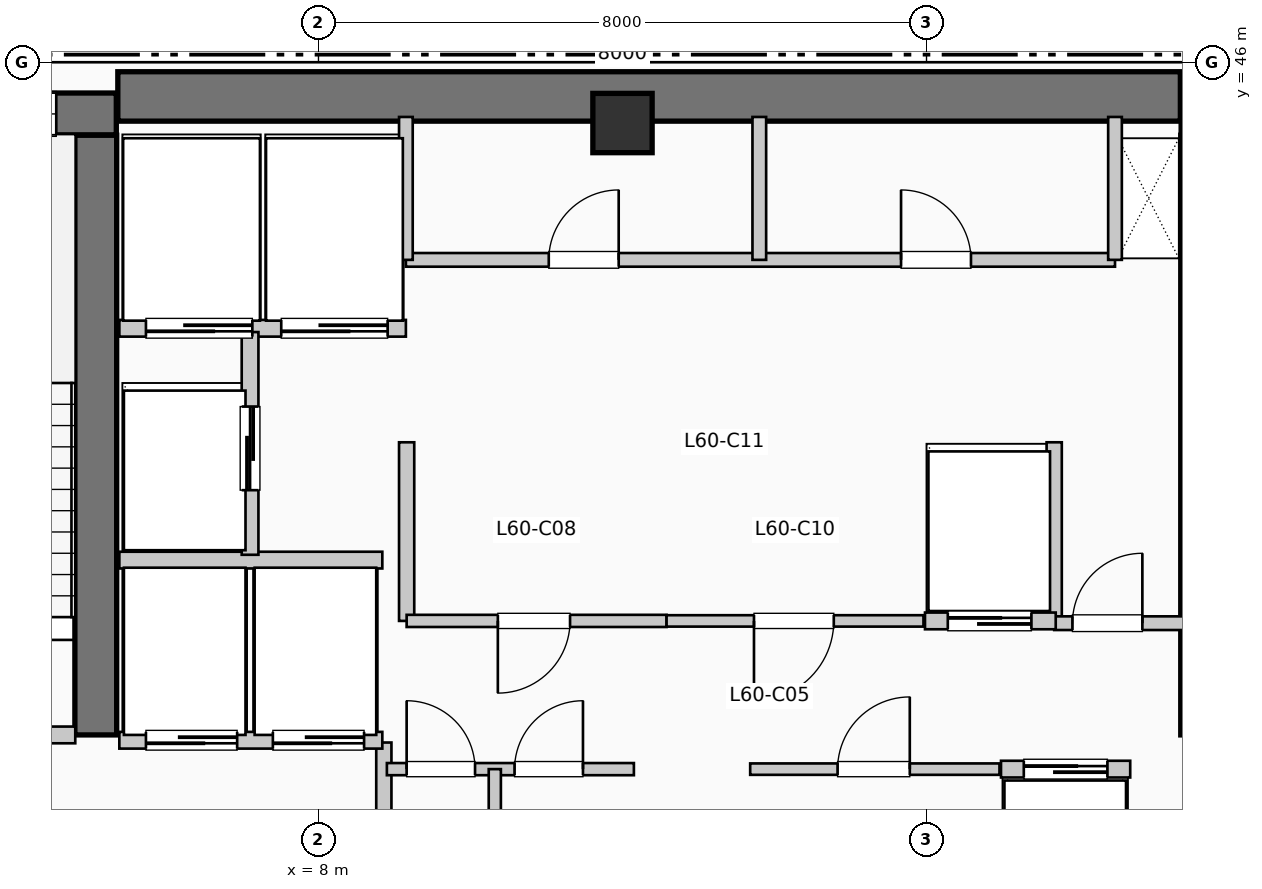
"""IFC4 building model, lengths in metres.
Left out: names, types, materials, properties, quantities, classifications, styles, units other than length and angle.
Written with IfcOpenShell. Run it as: python <this file> out.ifc"""

import sys

from ifc_helpers import new_model, si_unit, direction, frame, frame_2d, origin, origin_2d, place, context, subcontext, project, spatial, rectangle, extrude, element, fill, save


model = new_model("IFC4")
c1 = context("Model", 3, precision=1e-05, world=origin(), true_north=direction((0.0, 1.0)))
c2 = subcontext(c1, "Body", "Model", "MODEL_VIEW")
j1 = project(units=[si_unit("LENGTHUNIT", "METRE"), si_unit("PLANEANGLEUNIT", "RADIAN")], contexts=[c1])
p1 = place(None, origin())
s1 = spatial("IfcSite", under=j1, at=p1, CompositionType="ELEMENT")
p2 = place(p1, origin())
s2 = spatial("IfcBuilding", under=s1, at=p2, CompositionType="ELEMENT")
p3 = place(p2, frame((0.0, 0.0, 247.5)))
s3 = spatial("IfcBuildingStorey", under=s2, at=p3, CompositionType="ELEMENT", Elevation=247.5)
p4 = place(p3, frame((5.36, 45.55, 0.0), z_axis=(0.0, 0.0, 1.0), x_axis=(1.0, 0.0, 0.0)))
e1 = element("IfcWall", 1, at=p4, inside=s3, PredefinedType="SHEAR", context=c2, shape_type="SweptSolid", body=[
    extrude(rectangle(XDim=13.98, YDim=0.65, at=frame_2d((6.99, 0.0))), origin(), (0.0, 0.0, 1.0), 3.96),
])
p5 = place(p3, frame((5.07, 37.15, 0.0), z_axis=(0.0, 0.0, 1.0), x_axis=(0.0, 1.0, 0.0)))
e2 = element("IfcWall", 2, at=p5, inside=s3, PredefinedType="SHEAR", context=c2, shape_type="SweptSolid", body=[
    extrude(rectangle(XDim=7.89, YDim=0.55, at=frame_2d((3.945, 0.0))), origin(), (0.0, 0.0, 1.0), 3.96),
])
p6 = place(p3, frame((1.1, 45.32, 0.0), z_axis=(0.0, 0.0, 1.0), x_axis=(1.0, 0.0, 0.0)))
e3 = element("IfcWall", 3, at=p6, inside=s3, PredefinedType="SHEAR", context=c2, shape_type="SweptSolid", body=[
    extrude(rectangle(XDim=4.24, YDim=0.55, at=frame_2d((2.12, 0.0))), origin(), (0.0, 0.0, 1.0), 3.96),
])
p7 = place(p6, frame((2.05, 0.0, 1.05)))
e4 = element("IfcOpeningElement", 4, at=p7, cuts=e3, PredefinedType="OPENING", context=c2, shape_type="SweptSolid", body=[
    extrude(rectangle(XDim=1.4, YDim=1.8, at=frame_2d((0.7, 0.9))), frame((0.0, 0.285, 0.0), z_axis=(0.0, -1.0, 0.0), x_axis=(1.0, 0.0, 0.0)), (0.0, 0.0, 1.0), 0.57),
])
p8 = place(p3, frame((19.62, 37.15, 0.0), z_axis=(0.0, 0.0, 1.0), x_axis=(0.0, 1.0, 0.0)))
e5 = element("IfcWall", 5, at=p8, inside=s3, PredefinedType="SHEAR", context=c2, shape_type="SweptSolid", body=[
    extrude(rectangle(XDim=7.89, YDim=0.55, at=frame_2d((3.945, 0.0))), origin(), (0.0, 0.0, 1.0), 3.96),
])
p9 = place(p3, frame((19.35, 45.32, 0.0), z_axis=(0.0, 0.0, 1.0), x_axis=(1.0, 0.0, 0.0)))
e6 = element("IfcWall", 6, at=p9, inside=s3, PredefinedType="SHEAR", context=c2, shape_type="SweptSolid", body=[
    extrude(rectangle(XDim=3.69, YDim=0.55, at=frame_2d((1.845, 0.0))), origin(), (0.0, 0.0, 1.0), 3.96),
])
p10 = place(p9, frame((1.15, 0.0, 1.05)))
e7 = element("IfcOpeningElement", 7, at=p10, cuts=e6, PredefinedType="OPENING", context=c2, shape_type="SweptSolid", body=[
    extrude(rectangle(XDim=1.4, YDim=1.8, at=frame_2d((0.7, 0.9))), frame((0.0, 0.285, 0.0), z_axis=(0.0, -1.0, 0.0), x_axis=(1.0, 0.0, 0.0)), (0.0, 0.0, 1.0), 0.57),
])
p11 = place(p3, frame((12.0, 45.2, 0.0), z_axis=(0.0, 0.0, 1.0), x_axis=(1.0, 0.0, 0.0)))
e8 = element("IfcColumn", 8, at=p11, inside=s3, PredefinedType="COLUMN", context=c2, shape_type="SweptSolid", body=[
    extrude(rectangle(XDim=0.78, YDim=0.78, at=origin_2d()), origin(), (0.0, 0.0, 1.0), 3.96),
])
p12 = place(p3, frame((1.65, 37.15, 0.0), z_axis=(0.0, 0.0, 1.0), x_axis=(1.0, 0.0, 0.0)))
e9 = element("IfcWall", 9, at=p12, inside=s3, PredefinedType="PARTITIONING", context=c2, shape_type="SweptSolid", body=[
    extrude(rectangle(XDim=3.15, YDim=0.22, at=frame_2d((1.575, 0.0))), origin(), (0.0, 0.0, 1.0), 3.54),
])
p13 = place(p12, frame((2.05, 0.0, 0.0), z_axis=(0.0, 0.0, 1.0), x_axis=(-1.0, 0.0, 0.0)))
e10 = element("IfcOpeningElement", 10, at=p13, cuts=e9, PredefinedType="OPENING", context=c2, shape_type="SweptSolid", body=[
    extrude(rectangle(XDim=1.05, YDim=2.15, at=frame_2d((0.525, 1.075))), frame((0.0, 0.12, 0.0), z_axis=(0.0, -1.0, 0.0), x_axis=(1.0, 0.0, 0.0)), (0.0, 0.0, 1.0), 0.24),
])
p14 = place(p3, frame((8.86, 34.55, 0.0), z_axis=(0.0, 0.0, 1.0), x_axis=(0.0, 1.0, 0.0)))
e11 = element("IfcWall", 11, at=p14, inside=s3, PredefinedType="PARTITIONING", context=c2, shape_type="SweptSolid", body=[
    extrude(rectangle(XDim=2.5, YDim=0.2, at=frame_2d((1.25, 0.0))), origin(), (0.0, 0.0, 1.0), 3.54),
])
p15 = place(p3, frame((5.38, 37.08, 0.0), z_axis=(0.0, 0.0, 1.0), x_axis=(1.0, 0.0, 0.0)))
e12 = element("IfcWall", 12, at=p15, inside=s3, PredefinedType="PARTITIONING", context=c2, shape_type="SweptSolid", body=[
    extrude(rectangle(XDim=3.46, YDim=0.22, at=frame_2d((1.73, 0.0))), origin(), (0.0, 0.0, 1.0), 3.54),
])
p16 = place(p15, frame((1.55, 0.0, 0.0), z_axis=(0.0, 0.0, 1.0), x_axis=(-1.0, 0.0, 0.0)))
e13 = element("IfcOpeningElement", 13, at=p16, cuts=e12, PredefinedType="OPENING", context=c2, shape_type="SweptSolid", body=[
    extrude(rectangle(XDim=1.2, YDim=2.2, at=frame_2d((0.6, 1.1))), frame((0.0, 0.12, 0.0), z_axis=(0.0, -1.0, 0.0), x_axis=(1.0, 0.0, 0.0)), (0.0, 0.0, 1.0), 0.24),
])
p17 = place(p15, frame((3.22, 0.0, 0.0), z_axis=(0.0, 0.0, 1.0), x_axis=(-1.0, 0.0, 0.0)))
e14 = element("IfcOpeningElement", 14, at=p17, cuts=e12, PredefinedType="OPENING", context=c2, shape_type="SweptSolid", body=[
    extrude(rectangle(XDim=1.2, YDim=2.2, at=frame_2d((0.6, 1.1))), frame((0.0, 0.12, 0.0), z_axis=(0.0, -1.0, 0.0), x_axis=(1.0, 0.0, 0.0)), (0.0, 0.0, 1.0), 0.24),
])
p18 = place(p3, frame((5.38, 39.45, 0.0), z_axis=(0.0, 0.0, 1.0), x_axis=(1.0, 0.0, 0.0)))
e15 = element("IfcWall", 15, at=p18, inside=s3, PredefinedType="PARTITIONING", context=c2, shape_type="SweptSolid", body=[
    extrude(rectangle(XDim=3.46, YDim=0.22, at=frame_2d((1.73, 0.0))), origin(), (0.0, 0.0, 1.0), 3.54),
])
p19 = place(p3, frame((5.38, 42.5, 0.0), z_axis=(0.0, 0.0, 1.0), x_axis=(1.0, 0.0, 0.0)))
e16 = element("IfcWall", 16, at=p19, inside=s3, PredefinedType="PARTITIONING", context=c2, shape_type="SweptSolid", body=[
    extrude(rectangle(XDim=3.77, YDim=0.22, at=frame_2d((1.885, 0.0))), origin(), (0.0, 0.0, 1.0), 3.54),
])
p20 = place(p19, frame((1.75, 0.0, 0.0), z_axis=(0.0, 0.0, 1.0), x_axis=(-1.0, 0.0, 0.0)))
e17 = element("IfcOpeningElement", 17, at=p20, cuts=e16, PredefinedType="OPENING", context=c2, shape_type="SweptSolid", body=[
    extrude(rectangle(XDim=1.4, YDim=2.2, at=frame_2d((0.7, 1.1))), frame((0.0, 0.12, 0.0), z_axis=(0.0, -1.0, 0.0), x_axis=(1.0, 0.0, 0.0)), (0.0, 0.0, 1.0), 0.24),
])
p21 = place(p19, frame((3.53, 0.0, 0.0), z_axis=(0.0, 0.0, 1.0), x_axis=(-1.0, 0.0, 0.0)))
e18 = element("IfcOpeningElement", 18, at=p21, cuts=e16, PredefinedType="OPENING", context=c2, shape_type="SweptSolid", body=[
    extrude(rectangle(XDim=1.4, YDim=2.2, at=frame_2d((0.7, 1.1))), frame((0.0, 0.12, 0.0), z_axis=(0.0, -1.0, 0.0), x_axis=(1.0, 0.0, 0.0)), (0.0, 0.0, 1.0), 0.24),
])
p22 = place(p3, frame((7.1, 39.52, 0.0), z_axis=(0.0, 0.0, 1.0), x_axis=(0.0, 1.0, 0.0)))
e19 = element("IfcWall", 19, at=p22, inside=s3, PredefinedType="PARTITIONING", context=c2, shape_type="SweptSolid", body=[
    extrude(rectangle(XDim=2.93, YDim=0.22, at=frame_2d((1.465, 0.0))), origin(), (0.0, 0.0, 1.0), 3.54),
])
p23 = place(p22, frame((0.85, 0.0, 0.0)))
e20 = element("IfcOpeningElement", 20, at=p23, cuts=e19, PredefinedType="OPENING", context=c2, shape_type="SweptSolid", body=[
    extrude(rectangle(XDim=1.1, YDim=2.2, at=frame_2d((0.55, 1.1))), frame((0.0, 0.12, 0.0), z_axis=(0.0, -1.0, 0.0), x_axis=(1.0, 0.0, 0.0)), (0.0, 0.0, 1.0), 0.24),
])
for number, where, z_axis, x_axis in (
    (21, (9.16, 38.65, 0.0), (0.0, 0.0, 1.0), (0.0, 1.0, 0.0)),
    (22, (17.68, 38.65, 0.0), (0.0, 0.0, 1.0), (0.0, 1.0, 0.0)),
):
    element("IfcWall", number, at=place(p3, frame(where, z_axis=z_axis, x_axis=x_axis)), inside=s3, PredefinedType="PARTITIONING", context=c2, shape_type="SweptSolid", body=[
        extrude(rectangle(XDim=2.35, YDim=0.2, at=frame_2d((1.175, 0.0))), origin(), (0.0, 0.0, 1.0), 3.54),
    ])
p24 = place(p3, frame((17.68, 38.62, 0.0), z_axis=(0.0, 0.0, 1.0), x_axis=(1.0, 0.0, 0.0)))
e23 = element("IfcWall", 23, at=p24, inside=s3, PredefinedType="PARTITIONING", context=c2, shape_type="SweptSolid", body=[
    extrude(rectangle(XDim=1.84, YDim=0.18, at=frame_2d((0.92, 0.0))), origin(), (0.0, 0.0, 1.0), 3.54),
])
p25 = place(p24, frame((0.24, 0.0, 0.0)))
e24 = element("IfcOpeningElement", 24, at=p25, cuts=e23, PredefinedType="OPENING", context=c2, shape_type="SweptSolid", body=[
    extrude(rectangle(XDim=0.92, YDim=2.1, at=frame_2d((0.46, 1.05))), frame((0.0, 0.1, 0.0), z_axis=(0.0, -1.0, 0.0), x_axis=(1.0, 0.0, 0.0)), (0.0, 0.0, 1.0), 0.2),
])
p26 = place(p3, frame((8.9, 36.7, 0.0), z_axis=(0.0, 0.0, 1.0), x_axis=(1.0, 0.0, 0.0)))
e25 = element("IfcWall", 25, at=p26, inside=s3, PredefinedType="PARTITIONING", context=c2, shape_type="SweptSolid", body=[
    extrude(rectangle(XDim=3.25, YDim=0.16, at=frame_2d((1.625, 0.0))), origin(), (0.0, 0.0, 1.0), 3.54),
])
p27 = place(p26, frame((0.26, 0.0, 0.0)))
e26 = element("IfcOpeningElement", 26, at=p27, cuts=e25, PredefinedType="OPENING", context=c2, shape_type="SweptSolid", body=[
    extrude(rectangle(XDim=0.9, YDim=2.15, at=frame_2d((0.45, 1.075))), frame((0.0, 0.09, 0.0), z_axis=(0.0, -1.0, 0.0), x_axis=(1.0, 0.0, 0.0)), (0.0, 0.0, 1.0), 0.18),
])
p28 = place(p26, frame((1.68, 0.0, 0.0)))
e27 = element("IfcOpeningElement", 27, at=p28, cuts=e25, PredefinedType="OPENING", context=c2, shape_type="SweptSolid", body=[
    extrude(rectangle(XDim=0.9, YDim=2.15, at=frame_2d((0.45, 1.075))), frame((0.0, 0.09, 0.0), z_axis=(0.0, -1.0, 0.0), x_axis=(1.0, 0.0, 0.0)), (0.0, 0.0, 1.0), 0.18),
])
p29 = place(p3, frame((10.32, 34.55, 0.0), z_axis=(0.0, 0.0, 1.0), x_axis=(0.0, 1.0, 0.0)))
e28 = element("IfcWall", 28, at=p29, inside=s3, PredefinedType="PARTITIONING", context=c2, shape_type="SweptSolid", body=[
    extrude(rectangle(XDim=2.15, YDim=0.16, at=frame_2d((1.075, 0.0))), origin(), (0.0, 0.0, 1.0), 3.54),
])
p30 = place(p3, frame((9.16, 38.65, 0.0), z_axis=(0.0, 0.0, 1.0), x_axis=(1.0, 0.0, 0.0)))
e29 = element("IfcWall", 29, at=p30, inside=s3, PredefinedType="PARTITIONING", context=c2, shape_type="SweptSolid", body=[
    extrude(rectangle(XDim=3.42, YDim=0.16, at=frame_2d((1.71, 0.0))), origin(), (0.0, 0.0, 1.0), 3.54),
])
p31 = place(p30, frame((2.15, 0.0, 0.0), z_axis=(0.0, 0.0, 1.0), x_axis=(-1.0, 0.0, 0.0)))
e30 = element("IfcOpeningElement", 30, at=p31, cuts=e29, PredefinedType="OPENING", context=c2, shape_type="SweptSolid", body=[
    extrude(rectangle(XDim=0.95, YDim=2.15, at=frame_2d((0.475, 1.075))), frame((0.0, 0.09, 0.0), z_axis=(0.0, -1.0, 0.0), x_axis=(1.0, 0.0, 0.0)), (0.0, 0.0, 1.0), 0.18),
])
p32 = place(p3, frame((13.68, 36.7, 0.0), z_axis=(0.0, 0.0, 1.0), x_axis=(1.0, 0.0, 0.0)))
e31 = element("IfcWall", 31, at=p32, inside=s3, PredefinedType="PARTITIONING", context=c2, shape_type="SweptSolid", body=[
    extrude(rectangle(XDim=3.28, YDim=0.15, at=frame_2d((1.64, 0.0))), origin(), (0.0, 0.0, 1.0), 3.54),
])
p33 = place(p32, frame((1.15, 0.0, 0.0)))
e32 = element("IfcOpeningElement", 32, at=p33, cuts=e31, PredefinedType="OPENING", context=c2, shape_type="SweptSolid", body=[
    extrude(rectangle(XDim=0.95, YDim=2.15, at=frame_2d((0.475, 1.075))), frame((0.0, 0.085, 0.0), z_axis=(0.0, -1.0, 0.0), x_axis=(1.0, 0.0, 0.0)), (0.0, 0.0, 1.0), 0.17),
])
p34 = place(p3, frame((12.58, 38.65, 0.0), z_axis=(0.0, 0.0, 1.0), x_axis=(1.0, 0.0, 0.0)))
e33 = element("IfcWall", 33, at=p34, inside=s3, PredefinedType="PARTITIONING", context=c2, shape_type="SweptSolid", body=[
    extrude(rectangle(XDim=3.38, YDim=0.15, at=frame_2d((1.69, 0.0))), origin(), (0.0, 0.0, 1.0), 3.54),
])
p35 = place(p34, frame((2.2, 0.0, 0.0), z_axis=(0.0, 0.0, 1.0), x_axis=(-1.0, 0.0, 0.0)))
e34 = element("IfcOpeningElement", 34, at=p35, cuts=e33, PredefinedType="OPENING", context=c2, shape_type="SweptSolid", body=[
    extrude(rectangle(XDim=1.05, YDim=2.15, at=frame_2d((0.525, 1.075))), frame((0.0, 0.085, 0.0), z_axis=(0.0, -1.0, 0.0), x_axis=(1.0, 0.0, 0.0)), (0.0, 0.0, 1.0), 0.17),
])
p36 = place(p3, frame((16.98, 36.7, 0.0), z_axis=(0.0, 0.0, 1.0), x_axis=(1.0, 0.0, 0.0)))
e35 = element("IfcWall", 35, at=p36, inside=s3, PredefinedType="PARTITIONING", context=c2, shape_type="SweptSolid", body=[
    extrude(rectangle(XDim=1.7, YDim=0.22, at=frame_2d((0.85, 0.0))), origin(), (0.0, 0.0, 1.0), 3.54),
])
p37 = place(p36, frame((0.3, 0.0, 0.0)))
e36 = element("IfcOpeningElement", 36, at=p37, cuts=e35, PredefinedType="OPENING", context=c2, shape_type="SweptSolid", body=[
    extrude(rectangle(XDim=1.1, YDim=2.2, at=frame_2d((0.55, 1.1))), frame((0.0, 0.12, 0.0), z_axis=(0.0, -1.0, 0.0), x_axis=(1.0, 0.0, 0.0)), (0.0, 0.0, 1.0), 0.24),
])
p38 = place(p3, frame((15.98, 38.65, 0.0), z_axis=(0.0, 0.0, 1.0), x_axis=(1.0, 0.0, 0.0)))
e37 = element("IfcWall", 37, at=p38, inside=s3, PredefinedType="PARTITIONING", context=c2, shape_type="SweptSolid", body=[
    extrude(rectangle(XDim=1.72, YDim=0.22, at=frame_2d((0.86, 0.0))), origin(), (0.0, 0.0, 1.0), 3.54),
])
p39 = place(p38, frame((0.3, 0.0, 0.0)))
e38 = element("IfcOpeningElement", 38, at=p39, cuts=e37, PredefinedType="OPENING", context=c2, shape_type="SweptSolid", body=[
    extrude(rectangle(XDim=1.1, YDim=2.2, at=frame_2d((0.55, 1.1))), frame((0.0, 0.12, 0.0), z_axis=(0.0, -1.0, 0.0), x_axis=(1.0, 0.0, 0.0)), (0.0, 0.0, 1.0), 0.24),
])
p40 = place(p3, frame((9.15, 43.4, 0.0), z_axis=(0.0, 0.0, 1.0), x_axis=(1.0, 0.0, 0.0)))
e39 = element("IfcWall", 39, at=p40, inside=s3, PredefinedType="PLUMBINGWALL", context=c2, shape_type="SweptSolid", body=[
    extrude(rectangle(XDim=9.33, YDim=0.18, at=frame_2d((4.665, 0.0))), origin(), (0.0, 0.0, 1.0), 3.54),
])
p41 = place(p40, frame((1.88, 0.0, 0.0)))
e40 = element("IfcOpeningElement", 40, at=p41, cuts=e39, PredefinedType="OPENING", context=c2, shape_type="SweptSolid", body=[
    extrude(rectangle(XDim=0.92, YDim=2.1, at=frame_2d((0.46, 1.05))), frame((0.0, 0.1, 0.0), z_axis=(0.0, -1.0, 0.0), x_axis=(1.0, 0.0, 0.0)), (0.0, 0.0, 1.0), 0.2),
])
p42 = place(p40, frame((6.515, 0.0, 0.0)))
e41 = element("IfcOpeningElement", 41, at=p42, cuts=e39, PredefinedType="OPENING", context=c2, shape_type="SweptSolid", body=[
    extrude(rectangle(XDim=0.92, YDim=2.1, at=frame_2d((0.46, 1.05))), frame((0.0, 0.1, 0.0), z_axis=(0.0, -1.0, 0.0), x_axis=(1.0, 0.0, 0.0)), (0.0, 0.0, 1.0), 0.2),
])
for number, where, z_axis, x_axis in (
    (42, (9.15, 43.4, 0.0), (0.0, 0.0, 1.0), (0.0, 1.0, 0.0)),
    (43, (18.48, 43.4, 0.0), (0.0, 0.0, 1.0), (0.0, 1.0, 0.0)),
    (44, (13.8, 43.4, 0.0), (0.0, 0.0, 1.0), (0.0, 1.0, 0.0)),
):
    element("IfcWall", number, at=place(p3, frame(where, z_axis=z_axis, x_axis=x_axis)), inside=s3, PredefinedType="PLUMBINGWALL", context=c2, shape_type="SweptSolid", body=[
        extrude(rectangle(XDim=1.88, YDim=0.18, at=frame_2d((0.94, 0.0))), origin(), (0.0, 0.0, 1.0), 3.54),
    ])
p43 = place(p7, origin())
e45 = element("IfcWindow", 45, at=p43, inside=s3, PartitioningType="SINGLE_PANEL", PredefinedType="WINDOW", context=c2, shape_type="SweptSolid", body=[
    extrude(rectangle(XDim=1.4, YDim=1.8, at=frame_2d((0.7, 0.9))), frame((0.0, 0.03, 0.0), z_axis=(0.0, -1.0, 0.0), x_axis=(1.0, 0.0, 0.0)), (0.0, 0.0, 1.0), 0.06),
])
fill(e4, e45)
p44 = place(p16, origin())
e46 = element("IfcDoor", 46, at=p44, inside=s3, OperationType="SLIDING_TO_RIGHT", PredefinedType="DOOR", context=c2, shape_type="SweptSolid", body=[
    extrude(rectangle(XDim=1.2, YDim=2.2, at=frame_2d((0.6, 1.1))), frame((0.0, 0.025, 0.0), z_axis=(0.0, -1.0, 0.0), x_axis=(1.0, 0.0, 0.0)), (0.0, 0.0, 1.0), 0.05),
])
fill(e13, e46)
p45 = place(p17, origin())
e47 = element("IfcDoor", 47, at=p45, inside=s3, OperationType="SLIDING_TO_RIGHT", PredefinedType="DOOR", context=c2, shape_type="SweptSolid", body=[
    extrude(rectangle(XDim=1.2, YDim=2.2, at=frame_2d((0.6, 1.1))), frame((0.0, 0.025, 0.0), z_axis=(0.0, -1.0, 0.0), x_axis=(1.0, 0.0, 0.0)), (0.0, 0.0, 1.0), 0.05),
])
fill(e14, e47)
p46 = place(p20, origin())
e48 = element("IfcDoor", 48, at=p46, inside=s3, OperationType="SLIDING_TO_LEFT", PredefinedType="DOOR", context=c2, shape_type="SweptSolid", body=[
    extrude(rectangle(XDim=1.4, YDim=2.2, at=frame_2d((0.7, 1.1))), frame((0.0, 0.025, 0.0), z_axis=(0.0, -1.0, 0.0), x_axis=(1.0, 0.0, 0.0)), (0.0, 0.0, 1.0), 0.05),
])
fill(e17, e48)
p47 = place(p21, origin())
e49 = element("IfcDoor", 49, at=p47, inside=s3, OperationType="SLIDING_TO_LEFT", PredefinedType="DOOR", context=c2, shape_type="SweptSolid", body=[
    extrude(rectangle(XDim=1.4, YDim=2.2, at=frame_2d((0.7, 1.1))), frame((0.0, 0.025, 0.0), z_axis=(0.0, -1.0, 0.0), x_axis=(1.0, 0.0, 0.0)), (0.0, 0.0, 1.0), 0.05),
])
fill(e18, e49)
p48 = place(p23, origin())
e50 = element("IfcDoor", 50, at=p48, inside=s3, OperationType="SLIDING_TO_LEFT", PredefinedType="DOOR", context=c2, shape_type="SweptSolid", body=[
    extrude(rectangle(XDim=1.1, YDim=2.2, at=frame_2d((0.55, 1.1))), frame((0.0, 0.025, 0.0), z_axis=(0.0, -1.0, 0.0), x_axis=(1.0, 0.0, 0.0)), (0.0, 0.0, 1.0), 0.05),
])
fill(e20, e50)
p49 = place(p25, origin())
e51 = element("IfcDoor", 51, at=p49, inside=s3, OperationType="SINGLE_SWING_RIGHT", PredefinedType="DOOR", context=c2, shape_type="SweptSolid", body=[
    extrude(rectangle(XDim=0.92, YDim=2.1, at=frame_2d((0.46, 1.05))), frame((0.0, 0.025, 0.0), z_axis=(0.0, -1.0, 0.0), x_axis=(1.0, 0.0, 0.0)), (0.0, 0.0, 1.0), 0.05),
])
fill(e24, e51)
p50 = place(p27, origin())
e52 = element("IfcDoor", 52, at=p50, inside=s3, OperationType="SINGLE_SWING_LEFT", PredefinedType="DOOR", context=c2, shape_type="SweptSolid", body=[
    extrude(rectangle(XDim=0.9, YDim=2.15, at=frame_2d((0.45, 1.075))), frame((0.0, 0.025, 0.0), z_axis=(0.0, -1.0, 0.0), x_axis=(1.0, 0.0, 0.0)), (0.0, 0.0, 1.0), 0.05),
])
fill(e26, e52)
p51 = place(p28, origin())
e53 = element("IfcDoor", 53, at=p51, inside=s3, OperationType="SINGLE_SWING_RIGHT", PredefinedType="DOOR", context=c2, shape_type="SweptSolid", body=[
    extrude(rectangle(XDim=0.9, YDim=2.15, at=frame_2d((0.45, 1.075))), frame((0.0, 0.025, 0.0), z_axis=(0.0, -1.0, 0.0), x_axis=(1.0, 0.0, 0.0)), (0.0, 0.0, 1.0), 0.05),
])
fill(e27, e53)
p52 = place(p31, origin())
e54 = element("IfcDoor", 54, at=p52, inside=s3, OperationType="SINGLE_SWING_LEFT", PredefinedType="DOOR", context=c2, shape_type="SweptSolid", body=[
    extrude(rectangle(XDim=0.95, YDim=2.15, at=frame_2d((0.475, 1.075))), frame((0.0, 0.025, 0.0), z_axis=(0.0, -1.0, 0.0), x_axis=(1.0, 0.0, 0.0)), (0.0, 0.0, 1.0), 0.05),
])
fill(e30, e54)
p53 = place(p33, origin())
e55 = element("IfcDoor", 55, at=p53, inside=s3, OperationType="SINGLE_SWING_RIGHT", PredefinedType="DOOR", context=c2, shape_type="SweptSolid", body=[
    extrude(rectangle(XDim=0.95, YDim=2.15, at=frame_2d((0.475, 1.075))), frame((0.0, 0.025, 0.0), z_axis=(0.0, -1.0, 0.0), x_axis=(1.0, 0.0, 0.0)), (0.0, 0.0, 1.0), 0.05),
])
fill(e32, e55)
p54 = place(p35, origin())
e56 = element("IfcDoor", 56, at=p54, inside=s3, OperationType="SINGLE_SWING_LEFT", PredefinedType="DOOR", context=c2, shape_type="SweptSolid", body=[
    extrude(rectangle(XDim=1.05, YDim=2.15, at=frame_2d((0.525, 1.075))), frame((0.0, 0.025, 0.0), z_axis=(0.0, -1.0, 0.0), x_axis=(1.0, 0.0, 0.0)), (0.0, 0.0, 1.0), 0.05),
])
fill(e34, e56)
p55 = place(p37, origin())
e57 = element("IfcDoor", 57, at=p55, inside=s3, OperationType="SLIDING_TO_LEFT", PredefinedType="DOOR", context=c2, shape_type="SweptSolid", body=[
    extrude(rectangle(XDim=1.1, YDim=2.2, at=frame_2d((0.55, 1.1))), frame((0.0, 0.025, 0.0), z_axis=(0.0, -1.0, 0.0), x_axis=(1.0, 0.0, 0.0)), (0.0, 0.0, 1.0), 0.05),
])
fill(e36, e57)
p56 = place(p39, origin())
e58 = element("IfcDoor", 58, at=p56, inside=s3, OperationType="SLIDING_TO_LEFT", PredefinedType="DOOR", context=c2, shape_type="SweptSolid", body=[
    extrude(rectangle(XDim=1.1, YDim=2.2, at=frame_2d((0.55, 1.1))), frame((0.0, 0.025, 0.0), z_axis=(0.0, -1.0, 0.0), x_axis=(1.0, 0.0, 0.0)), (0.0, 0.0, 1.0), 0.05),
])
fill(e38, e58)
p57 = place(p41, origin())
e59 = element("IfcDoor", 59, at=p57, inside=s3, OperationType="SINGLE_SWING_RIGHT", PredefinedType="DOOR", context=c2, shape_type="SweptSolid", body=[
    extrude(rectangle(XDim=0.92, YDim=2.1, at=frame_2d((0.46, 1.05))), frame((0.0, 0.025, 0.0), z_axis=(0.0, -1.0, 0.0), x_axis=(1.0, 0.0, 0.0)), (0.0, 0.0, 1.0), 0.05),
])
fill(e40, e59)
p58 = place(p42, origin())
e60 = element("IfcDoor", 60, at=p58, inside=s3, OperationType="SINGLE_SWING_LEFT", PredefinedType="DOOR", context=c2, shape_type="SweptSolid", body=[
    extrude(rectangle(XDim=0.92, YDim=2.1, at=frame_2d((0.46, 1.05))), frame((0.0, 0.025, 0.0), z_axis=(0.0, -1.0, 0.0), x_axis=(1.0, 0.0, 0.0)), (0.0, 0.0, 1.0), 0.05),
])
fill(e41, e60)
save(model, sys.argv[1])
